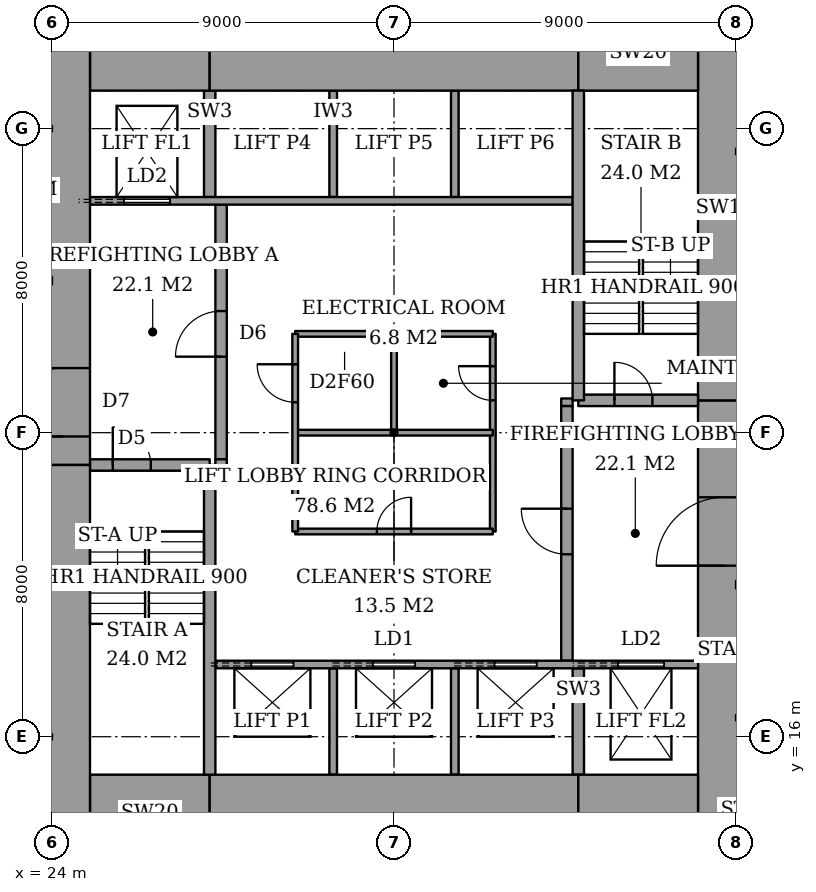
"""IFC4 building model, lengths in metres.
Left out: names, types, materials, properties, quantities, classifications, styles, units other than length and angle.
Written with IfcOpenShell. Run it as: python <this file> out.ifc"""

import sys

from ifc_helpers import new_model, si_unit, direction, frame, frame_2d, origin, place, context, subcontext, project, spatial, rectangle, extrude, element, fill, save


model = new_model("IFC4")
c1 = context("Model", 3, precision=1e-05, world=origin(), true_north=direction((0.0, 1.0)))
c2 = subcontext(c1, "Body", "Model", "MODEL_VIEW")
j1 = project(units=[si_unit("LENGTHUNIT", "METRE"), si_unit("PLANEANGLEUNIT", "RADIAN")], contexts=[c1])
p1 = place(None, origin())
s1 = spatial("IfcSite", under=j1, at=p1, CompositionType="ELEMENT")
p2 = place(p1, origin())
s2 = spatial("IfcBuilding", under=s1, at=p2, CompositionType="ELEMENT")
p3 = place(p2, frame((0.0, 0.0, 135.8)))
s3 = spatial("IfcBuildingStorey", under=s2, at=p3, CompositionType="ELEMENT", Elevation=135.8)
p4 = place(p3, frame((25.0, 14.0, 0.0), z_axis=(0.0, 0.0, 1.0), x_axis=(1.0, 0.0, 0.0)))
e1 = element("IfcWall", 1, at=p4, inside=s3, PredefinedType="SHEAR", context=c2, shape_type="SweptSolid", body=[
    extrude(rectangle(XDim=3.15, YDim=2.0, at=frame_2d((1.575, 0.0))), origin(), (0.0, 0.0, 1.0), 3.6),
])
p5 = place(p3, frame((28.15, 14.0, 0.0), z_axis=(0.0, 0.0, 1.0), x_axis=(1.0, 0.0, 0.0)))
e2 = element("IfcWall", 2, at=p5, inside=s3, PredefinedType="SHEAR", context=c2, shape_type="SweptSolid", body=[
    extrude(rectangle(XDim=9.7, YDim=2.0, at=frame_2d((4.85, 0.0))), origin(), (0.0, 0.0, 1.0), 3.6),
])
for number, where, z_axis, x_axis in (
    (3, (37.85, 14.0, 0.0), (0.0, 0.0, 1.0), (1.0, 0.0, 0.0)),
    (4, (25.0, 34.0, 0.0), (0.0, 0.0, 1.0), (1.0, 0.0, 0.0)),
):
    element("IfcWall", number, at=place(p3, frame(where, z_axis=z_axis, x_axis=x_axis)), inside=s3, PredefinedType="SHEAR", context=c2, shape_type="SweptSolid", body=[
        extrude(rectangle(XDim=3.15, YDim=2.0, at=frame_2d((1.575, 0.0))), origin(), (0.0, 0.0, 1.0), 3.6),
    ])
p6 = place(p3, frame((28.15, 34.0, 0.0), z_axis=(0.0, 0.0, 1.0), x_axis=(1.0, 0.0, 0.0)))
e5 = element("IfcWall", 5, at=p6, inside=s3, PredefinedType="SHEAR", context=c2, shape_type="SweptSolid", body=[
    extrude(rectangle(XDim=9.7, YDim=2.0, at=frame_2d((4.85, 0.0))), origin(), (0.0, 0.0, 1.0), 3.6),
])
p7 = place(p3, frame((37.85, 34.0, 0.0), z_axis=(0.0, 0.0, 1.0), x_axis=(1.0, 0.0, 0.0)))
e6 = element("IfcWall", 6, at=p7, inside=s3, PredefinedType="SHEAR", context=c2, shape_type="SweptSolid", body=[
    extrude(rectangle(XDim=3.15, YDim=2.0, at=frame_2d((1.575, 0.0))), origin(), (0.0, 0.0, 1.0), 3.6),
])
p8 = place(p3, frame((24.3, 13.0, 0.0), z_axis=(0.0, 0.0, 1.0), x_axis=(0.0, 1.0, 0.0)))
e7 = element("IfcWall", 7, at=p8, inside=s3, PredefinedType="SHEAR", context=c2, shape_type="SweptSolid", body=[
    extrude(rectangle(XDim=10.15, YDim=1.4, at=frame_2d((5.075, 0.0))), origin(), (0.0, 0.0, 1.0), 3.6),
])
p9 = place(p3, frame((24.3, 23.15, 0.0), z_axis=(0.0, 0.0, 1.0), x_axis=(0.0, 1.0, 0.0)))
e8 = element("IfcWall", 8, at=p9, inside=s3, PredefinedType="SHEAR", context=c2, shape_type="SweptSolid", body=[
    extrude(rectangle(XDim=11.85, YDim=1.4, at=frame_2d((5.925, 0.0))), origin(), (0.0, 0.0, 1.0), 3.6),
])
p10 = place(p9, frame((0.75, 0.0, 0.0)))
e9 = element("IfcOpeningElement", 9, at=p10, cuts=e8, PredefinedType="OPENING", context=c2, shape_type="SweptSolid", body=[
    extrude(rectangle(XDim=1.8, YDim=2.4, at=frame_2d((0.9, 1.2))), frame((0.0, 0.71, 0.0), z_axis=(0.0, -1.0, 0.0), x_axis=(1.0, 0.0, 0.0)), (0.0, 0.0, 1.0), 1.42),
])
p11 = place(p3, frame((41.7, 13.0, 0.0), z_axis=(0.0, 0.0, 1.0), x_axis=(0.0, 1.0, 0.0)))
e10 = element("IfcWall", 10, at=p11, inside=s3, PredefinedType="SHEAR", context=c2, shape_type="SweptSolid", body=[
    extrude(rectangle(XDim=11.85, YDim=1.4, at=frame_2d((5.925, 0.0))), origin(), (0.0, 0.0, 1.0), 3.6),
])
p12 = place(p11, frame((7.5, 0.0, 0.0)))
e11 = element("IfcOpeningElement", 11, at=p12, cuts=e10, PredefinedType="OPENING", context=c2, shape_type="SweptSolid", body=[
    extrude(rectangle(XDim=1.8, YDim=2.4, at=frame_2d((0.9, 1.2))), frame((0.0, 0.71, 0.0), z_axis=(0.0, -1.0, 0.0), x_axis=(1.0, 0.0, 0.0)), (0.0, 0.0, 1.0), 1.42),
])
p13 = place(p3, frame((41.7, 24.85, 0.0), z_axis=(0.0, 0.0, 1.0), x_axis=(0.0, 1.0, 0.0)))
e12 = element("IfcWall", 12, at=p13, inside=s3, PredefinedType="SHEAR", context=c2, shape_type="SweptSolid", body=[
    extrude(rectangle(XDim=10.15, YDim=1.4, at=frame_2d((5.075, 0.0))), origin(), (0.0, 0.0, 1.0), 3.6),
])
p14 = place(p3, frame((28.15, 15.0, 0.0), z_axis=(0.0, 0.0, 1.0), x_axis=(0.0, 1.0, 0.0)))
e13 = element("IfcWall", 13, at=p14, inside=s3, PredefinedType="SHEAR", context=c2, shape_type="SweptSolid", body=[
    extrude(rectangle(XDim=8.15, YDim=0.3, at=frame_2d((4.075, 0.0))), origin(), (0.0, 0.0, 1.0), 3.6),
])
p15 = place(p3, frame((25.0, 23.15, 0.0), z_axis=(0.0, 0.0, 1.0), x_axis=(1.0, 0.0, 0.0)))
e14 = element("IfcWall", 14, at=p15, inside=s3, PredefinedType="SHEAR", context=c2, shape_type="SweptSolid", body=[
    extrude(rectangle(XDim=3.15, YDim=0.3, at=frame_2d((1.575, 0.0))), origin(), (0.0, 0.0, 1.0), 3.6),
])
p16 = place(p15, frame((0.6, 0.0, 0.0)))
e15 = element("IfcOpeningElement", 15, at=p16, cuts=e14, PredefinedType="OPENING", context=c2, shape_type="SweptSolid", body=[
    extrude(rectangle(XDim=1.0, YDim=2.1, at=frame_2d((0.5, 1.05))), frame((0.0, 0.16, 0.0), z_axis=(0.0, -1.0, 0.0), x_axis=(1.0, 0.0, 0.0)), (0.0, 0.0, 1.0), 0.32),
])
p17 = place(p3, frame((37.85, 24.85, 0.0), z_axis=(0.0, 0.0, 1.0), x_axis=(0.0, 1.0, 0.0)))
e16 = element("IfcWall", 16, at=p17, inside=s3, PredefinedType="SHEAR", context=c2, shape_type="SweptSolid", body=[
    extrude(rectangle(XDim=8.15, YDim=0.3, at=frame_2d((4.075, 0.0))), origin(), (0.0, 0.0, 1.0), 3.6),
])
p18 = place(p3, frame((37.85, 24.85, 0.0), z_axis=(0.0, 0.0, 1.0), x_axis=(1.0, 0.0, 0.0)))
e17 = element("IfcWall", 17, at=p18, inside=s3, PredefinedType="SHEAR", context=c2, shape_type="SweptSolid", body=[
    extrude(rectangle(XDim=3.15, YDim=0.3, at=frame_2d((1.575, 0.0))), origin(), (0.0, 0.0, 1.0), 3.6),
])
p19 = place(p18, frame((0.95, 0.0, 0.0)))
e18 = element("IfcOpeningElement", 18, at=p19, cuts=e17, PredefinedType="OPENING", context=c2, shape_type="SweptSolid", body=[
    extrude(rectangle(XDim=1.0, YDim=2.1, at=frame_2d((0.5, 1.05))), frame((0.0, 0.16, 0.0), z_axis=(0.0, -1.0, 0.0), x_axis=(1.0, 0.0, 0.0)), (0.0, 0.0, 1.0), 0.32),
])
p20 = place(p3, frame((28.45, 23.3, 0.0), z_axis=(0.0, 0.0, 1.0), x_axis=(0.0, 1.0, 0.0)))
e19 = element("IfcWall", 19, at=p20, inside=s3, PredefinedType="PARTITIONING", context=c2, shape_type="SweptSolid", body=[
    extrude(rectangle(XDim=6.7, YDim=0.3, at=frame_2d((3.35, 0.0))), origin(), (0.0, 0.0, 1.0), 3.6),
])
p21 = place(p20, frame((2.7, 0.0, 0.0)))
e20 = element("IfcOpeningElement", 20, at=p21, cuts=e19, PredefinedType="OPENING", context=c2, shape_type="SweptSolid", body=[
    extrude(rectangle(XDim=1.2, YDim=2.1, at=frame_2d((0.6, 1.05))), frame((0.0, 0.16, 0.0), z_axis=(0.0, -1.0, 0.0), x_axis=(1.0, 0.0, 0.0)), (0.0, 0.0, 1.0), 0.32),
])
p22 = place(p3, frame((37.55, 18.0, 0.0), z_axis=(0.0, 0.0, 1.0), x_axis=(0.0, 1.0, 0.0)))
e21 = element("IfcWall", 21, at=p22, inside=s3, PredefinedType="PARTITIONING", context=c2, shape_type="SweptSolid", body=[
    extrude(rectangle(XDim=6.7, YDim=0.3, at=frame_2d((3.35, 0.0))), origin(), (0.0, 0.0, 1.0), 3.6),
])
p23 = place(p22, frame((2.8, 0.0, 0.0)))
e22 = element("IfcOpeningElement", 22, at=p23, cuts=e21, PredefinedType="OPENING", context=c2, shape_type="SweptSolid", body=[
    extrude(rectangle(XDim=1.2, YDim=2.1, at=frame_2d((0.6, 1.05))), frame((0.0, 0.16, 0.0), z_axis=(0.0, -1.0, 0.0), x_axis=(1.0, 0.0, 0.0)), (0.0, 0.0, 1.0), 0.32),
])
p24 = place(p3, frame((28.3, 17.9, 0.0), z_axis=(0.0, 0.0, 1.0), x_axis=(1.0, 0.0, 0.0)))
e23 = element("IfcWall", 23, at=p24, inside=s3, PredefinedType="PARTITIONING", context=c2, shape_type="SweptSolid", body=[
    extrude(rectangle(XDim=12.7, YDim=0.2, at=frame_2d((6.35, 0.0))), origin(), (0.0, 0.0, 1.0), 3.6),
])
p25 = place(p24, frame((0.95, 0.0, 0.0)))
e24 = element("IfcOpeningElement", 24, at=p25, cuts=e23, PredefinedType="OPENING", context=c2, shape_type="SweptSolid", body=[
    extrude(rectangle(XDim=1.1, YDim=2.1, at=frame_2d((0.55, 1.05))), frame((0.0, 0.11, 0.0), z_axis=(0.0, -1.0, 0.0), x_axis=(1.0, 0.0, 0.0)), (0.0, 0.0, 1.0), 0.22),
])
p26 = place(p24, frame((4.15, 0.0, 0.0)))
e25 = element("IfcOpeningElement", 25, at=p26, cuts=e23, PredefinedType="OPENING", context=c2, shape_type="SweptSolid", body=[
    extrude(rectangle(XDim=1.1, YDim=2.1, at=frame_2d((0.55, 1.05))), frame((0.0, 0.11, 0.0), z_axis=(0.0, -1.0, 0.0), x_axis=(1.0, 0.0, 0.0)), (0.0, 0.0, 1.0), 0.22),
])
p27 = place(p24, frame((7.35, 0.0, 0.0)))
e26 = element("IfcOpeningElement", 26, at=p27, cuts=e23, PredefinedType="OPENING", context=c2, shape_type="SweptSolid", body=[
    extrude(rectangle(XDim=1.1, YDim=2.1, at=frame_2d((0.55, 1.05))), frame((0.0, 0.11, 0.0), z_axis=(0.0, -1.0, 0.0), x_axis=(1.0, 0.0, 0.0)), (0.0, 0.0, 1.0), 0.22),
])
p28 = place(p24, frame((10.6, 0.0, 0.0)))
e27 = element("IfcOpeningElement", 27, at=p28, cuts=e23, PredefinedType="OPENING", context=c2, shape_type="SweptSolid", body=[
    extrude(rectangle(XDim=1.2, YDim=2.1, at=frame_2d((0.6, 1.05))), frame((0.0, 0.11, 0.0), z_axis=(0.0, -1.0, 0.0), x_axis=(1.0, 0.0, 0.0)), (0.0, 0.0, 1.0), 0.22),
])
p29 = place(p3, frame((25.0, 30.1, 0.0), z_axis=(0.0, 0.0, 1.0), x_axis=(1.0, 0.0, 0.0)))
e28 = element("IfcWall", 28, at=p29, inside=s3, PredefinedType="PARTITIONING", context=c2, shape_type="SweptSolid", body=[
    extrude(rectangle(XDim=12.7, YDim=0.2, at=frame_2d((6.35, 0.0))), origin(), (0.0, 0.0, 1.0), 3.6),
])
p30 = place(p29, frame((0.9, 0.0, 0.0)))
e29 = element("IfcOpeningElement", 29, at=p30, cuts=e28, PredefinedType="OPENING", context=c2, shape_type="SweptSolid", body=[
    extrude(rectangle(XDim=1.2, YDim=2.1, at=frame_2d((0.6, 1.05))), frame((0.0, 0.11, 0.0), z_axis=(0.0, -1.0, 0.0), x_axis=(1.0, 0.0, 0.0)), (0.0, 0.0, 1.0), 0.22),
])
for number, where, z_axis, x_axis in (
    (30, (31.4, 15.0, 0.0), (0.0, 0.0, 1.0), (0.0, 1.0, 0.0)),
    (31, (34.6, 15.0, 0.0), (0.0, 0.0, 1.0), (0.0, 1.0, 0.0)),
):
    element("IfcWall", number, at=place(p3, frame(where, z_axis=z_axis, x_axis=x_axis)), inside=s3, PredefinedType="PARTITIONING", context=c2, shape_type="SweptSolid", body=[
        extrude(rectangle(XDim=2.8, YDim=0.2, at=frame_2d((1.4, 0.0))), origin(), (0.0, 0.0, 1.0), 3.6),
    ])
p31 = place(p3, frame((37.85, 15.0, 0.0), z_axis=(0.0, 0.0, 1.0), x_axis=(0.0, 1.0, 0.0)))
e32 = element("IfcWall", 32, at=p31, inside=s3, PredefinedType="SHEAR", context=c2, shape_type="SweptSolid", body=[
    extrude(rectangle(XDim=2.8, YDim=0.3, at=frame_2d((1.4, 0.0))), origin(), (0.0, 0.0, 1.0), 3.6),
])
for number, where, z_axis, x_axis in (
    (33, (31.4, 30.2, 0.0), (0.0, 0.0, 1.0), (0.0, 1.0, 0.0)),
    (34, (34.6, 30.2, 0.0), (0.0, 0.0, 1.0), (0.0, 1.0, 0.0)),
):
    element("IfcWall", number, at=place(p3, frame(where, z_axis=z_axis, x_axis=x_axis)), inside=s3, PredefinedType="PARTITIONING", context=c2, shape_type="SweptSolid", body=[
        extrude(rectangle(XDim=2.8, YDim=0.2, at=frame_2d((1.4, 0.0))), origin(), (0.0, 0.0, 1.0), 3.6),
    ])
p32 = place(p3, frame((28.15, 30.2, 0.0), z_axis=(0.0, 0.0, 1.0), x_axis=(0.0, 1.0, 0.0)))
e35 = element("IfcWall", 35, at=p32, inside=s3, PredefinedType="SHEAR", context=c2, shape_type="SweptSolid", body=[
    extrude(rectangle(XDim=2.8, YDim=0.3, at=frame_2d((1.4, 0.0))), origin(), (0.0, 0.0, 1.0), 3.6),
])
for number, where, z_axis, x_axis in (
    (36, (28.3, 23.2, 0.0), (0.0, 0.0, 1.0), (1.0, 0.0, 0.0)),
    (37, (37.4, 24.8, 0.0), (0.0, 0.0, 1.0), (1.0, 0.0, 0.0)),
):
    element("IfcWall", number, at=place(p3, frame(where, z_axis=z_axis, x_axis=x_axis)), inside=s3, PredefinedType="PARTITIONING", context=c2, shape_type="SweptSolid", body=[
        extrude(rectangle(XDim=0.3, YDim=0.2, at=frame_2d((0.15, 0.0))), origin(), (0.0, 0.0, 1.0), 3.6),
    ])
p33 = place(p3, frame((30.4, 21.4, 0.0), z_axis=(0.0, 0.0, 1.0), x_axis=(1.0, 0.0, 0.0)))
e38 = element("IfcWall", 38, at=p33, inside=s3, PredefinedType="PARTITIONING", context=c2, shape_type="SweptSolid", body=[
    extrude(rectangle(XDim=5.2, YDim=0.15, at=frame_2d((2.6, 0.0))), origin(), (0.0, 0.0, 1.0), 3.35),
])
p34 = place(p33, frame((2.15, 0.0, 0.0)))
e39 = element("IfcOpeningElement", 39, at=p34, cuts=e38, PredefinedType="OPENING", context=c2, shape_type="SweptSolid", body=[
    extrude(rectangle(XDim=0.9, YDim=2.1, at=frame_2d((0.45, 1.05))), frame((0.0, 0.085, 0.0), z_axis=(0.0, -1.0, 0.0), x_axis=(1.0, 0.0, 0.0)), (0.0, 0.0, 1.0), 0.17),
])
p35 = place(p3, frame((30.4, 26.6, 0.0), z_axis=(0.0, 0.0, 1.0), x_axis=(1.0, 0.0, 0.0)))
e40 = element("IfcWall", 40, at=p35, inside=s3, PredefinedType="PARTITIONING", context=c2, shape_type="SweptSolid", body=[
    extrude(rectangle(XDim=5.2, YDim=0.15, at=frame_2d((2.6, 0.0))), origin(), (0.0, 0.0, 1.0), 3.35),
])
p36 = place(p3, frame((30.4, 21.4, 0.0), z_axis=(0.0, 0.0, 1.0), x_axis=(0.0, 1.0, 0.0)))
e41 = element("IfcWall", 41, at=p36, inside=s3, PredefinedType="PARTITIONING", context=c2, shape_type="SweptSolid", body=[
    extrude(rectangle(XDim=5.2, YDim=0.15, at=frame_2d((2.6, 0.0))), origin(), (0.0, 0.0, 1.0), 3.35),
])
p37 = place(p36, frame((3.4, 0.0, 0.0)))
e42 = element("IfcOpeningElement", 42, at=p37, cuts=e41, PredefinedType="OPENING", context=c2, shape_type="SweptSolid", body=[
    extrude(rectangle(XDim=1.0, YDim=2.1, at=frame_2d((0.5, 1.05))), frame((0.0, 0.085, 0.0), z_axis=(0.0, -1.0, 0.0), x_axis=(1.0, 0.0, 0.0)), (0.0, 0.0, 1.0), 0.17),
])
p38 = place(p3, frame((35.6, 21.4, 0.0), z_axis=(0.0, 0.0, 1.0), x_axis=(0.0, 1.0, 0.0)))
e43 = element("IfcWall", 43, at=p38, inside=s3, PredefinedType="PARTITIONING", context=c2, shape_type="SweptSolid", body=[
    extrude(rectangle(XDim=5.2, YDim=0.15, at=frame_2d((2.6, 0.0))), origin(), (0.0, 0.0, 1.0), 3.35),
])
p39 = place(p38, frame((3.45, 0.0, 0.0)))
e44 = element("IfcOpeningElement", 44, at=p39, cuts=e43, PredefinedType="OPENING", context=c2, shape_type="SweptSolid", body=[
    extrude(rectangle(XDim=0.9, YDim=2.1, at=frame_2d((0.45, 1.05))), frame((0.0, 0.085, 0.0), z_axis=(0.0, -1.0, 0.0), x_axis=(1.0, 0.0, 0.0)), (0.0, 0.0, 1.0), 0.17),
])
p40 = place(p3, frame((30.4, 24.0, 0.0), z_axis=(0.0, 0.0, 1.0), x_axis=(1.0, 0.0, 0.0)))
e45 = element("IfcWall", 45, at=p40, inside=s3, PredefinedType="PARTITIONING", context=c2, shape_type="SweptSolid", body=[
    extrude(rectangle(XDim=5.2, YDim=0.15, at=frame_2d((2.6, 0.0))), origin(), (0.0, 0.0, 1.0), 3.35),
])
p41 = place(p3, frame((33.0, 24.0, 0.0), z_axis=(0.0, 0.0, 1.0), x_axis=(0.0, 1.0, 0.0)))
e46 = element("IfcWall", 46, at=p41, inside=s3, PredefinedType="PARTITIONING", context=c2, shape_type="SweptSolid", body=[
    extrude(rectangle(XDim=2.6, YDim=0.15, at=frame_2d((1.3, 0.0))), origin(), (0.0, 0.0, 1.0), 3.35),
])
p42 = place(p16, origin())
e47 = element("IfcDoor", 47, at=p42, inside=s3, OperationType="SINGLE_SWING_RIGHT", PredefinedType="DOOR", context=c2, shape_type="SweptSolid", body=[
    extrude(rectangle(XDim=1.0, YDim=2.1, at=frame_2d((0.5, 1.05))), frame((0.0, 0.025, 0.0), z_axis=(0.0, -1.0, 0.0), x_axis=(1.0, 0.0, 0.0)), (0.0, 0.0, 1.0), 0.05),
])
fill(e15, e47)
p43 = place(p19, origin())
e48 = element("IfcDoor", 48, at=p43, inside=s3, OperationType="SINGLE_SWING_RIGHT", PredefinedType="DOOR", context=c2, shape_type="SweptSolid", body=[
    extrude(rectangle(XDim=1.0, YDim=2.1, at=frame_2d((0.5, 1.05))), frame((0.0, 0.025, 0.0), z_axis=(0.0, -1.0, 0.0), x_axis=(1.0, 0.0, 0.0)), (0.0, 0.0, 1.0), 0.05),
])
fill(e18, e48)
p44 = place(p21, origin())
e49 = element("IfcDoor", 49, at=p44, inside=s3, OperationType="SINGLE_SWING_RIGHT", PredefinedType="DOOR", context=c2, shape_type="SweptSolid", body=[
    extrude(rectangle(XDim=1.2, YDim=2.1, at=frame_2d((0.6, 1.05))), frame((0.0, 0.025, 0.0), z_axis=(0.0, -1.0, 0.0), x_axis=(1.0, 0.0, 0.0)), (0.0, 0.0, 1.0), 0.05),
])
fill(e20, e49)
p45 = place(p23, origin())
e50 = element("IfcDoor", 50, at=p45, inside=s3, OperationType="SINGLE_SWING_LEFT", PredefinedType="DOOR", context=c2, shape_type="SweptSolid", body=[
    extrude(rectangle(XDim=1.2, YDim=2.1, at=frame_2d((0.6, 1.05))), frame((0.0, 0.025, 0.0), z_axis=(0.0, -1.0, 0.0), x_axis=(1.0, 0.0, 0.0)), (0.0, 0.0, 1.0), 0.05),
])
fill(e22, e50)
p46 = place(p10, origin())
e51 = element("IfcDoor", 51, at=p46, inside=s3, OperationType="DOUBLE_DOOR_DOUBLE_SWING", PredefinedType="DOOR", context=c2, shape_type="SweptSolid", body=[
    extrude(rectangle(XDim=1.8, YDim=2.4, at=frame_2d((0.9, 1.2))), frame((0.0, 0.025, 0.0), z_axis=(0.0, -1.0, 0.0), x_axis=(1.0, 0.0, 0.0)), (0.0, 0.0, 1.0), 0.05),
])
fill(e9, e51)
p47 = place(p12, origin())
e52 = element("IfcDoor", 52, at=p47, inside=s3, OperationType="DOUBLE_DOOR_DOUBLE_SWING", PredefinedType="DOOR", context=c2, shape_type="SweptSolid", body=[
    extrude(rectangle(XDim=1.8, YDim=2.4, at=frame_2d((0.9, 1.2))), frame((0.0, 0.025, 0.0), z_axis=(0.0, -1.0, 0.0), x_axis=(1.0, 0.0, 0.0)), (0.0, 0.0, 1.0), 0.05),
])
fill(e11, e52)
p48 = place(p34, origin())
e53 = element("IfcDoor", 53, at=p48, inside=s3, OperationType="SINGLE_SWING_LEFT", PredefinedType="DOOR", context=c2, shape_type="SweptSolid", body=[
    extrude(rectangle(XDim=0.9, YDim=2.1, at=frame_2d((0.45, 1.05))), frame((0.0, 0.025, 0.0), z_axis=(0.0, -1.0, 0.0), x_axis=(1.0, 0.0, 0.0)), (0.0, 0.0, 1.0), 0.05),
])
fill(e39, e53)
p49 = place(p37, origin())
e54 = element("IfcDoor", 54, at=p49, inside=s3, OperationType="SINGLE_SWING_LEFT", PredefinedType="DOOR", context=c2, shape_type="SweptSolid", body=[
    extrude(rectangle(XDim=1.0, YDim=2.1, at=frame_2d((0.5, 1.05))), frame((0.0, 0.025, 0.0), z_axis=(0.0, -1.0, 0.0), x_axis=(1.0, 0.0, 0.0)), (0.0, 0.0, 1.0), 0.05),
])
fill(e42, e54)
p50 = place(p39, origin())
e55 = element("IfcDoor", 55, at=p50, inside=s3, OperationType="SINGLE_SWING_LEFT", PredefinedType="DOOR", context=c2, shape_type="SweptSolid", body=[
    extrude(rectangle(XDim=0.9, YDim=2.1, at=frame_2d((0.45, 1.05))), frame((0.0, 0.025, 0.0), z_axis=(0.0, -1.0, 0.0), x_axis=(1.0, 0.0, 0.0)), (0.0, 0.0, 1.0), 0.05),
])
fill(e44, e55)
p51 = place(p25, origin())
e56 = element("IfcDoor", 56, at=p51, inside=s3, OperationType="SLIDING_TO_LEFT", PredefinedType="DOOR", context=c2, shape_type="SweptSolid", body=[
    extrude(rectangle(XDim=1.1, YDim=2.1, at=frame_2d((0.55, 1.05))), frame((0.0, 0.025, 0.0), z_axis=(0.0, -1.0, 0.0), x_axis=(1.0, 0.0, 0.0)), (0.0, 0.0, 1.0), 0.05),
])
fill(e24, e56)
p52 = place(p26, origin())
e57 = element("IfcDoor", 57, at=p52, inside=s3, OperationType="SLIDING_TO_LEFT", PredefinedType="DOOR", context=c2, shape_type="SweptSolid", body=[
    extrude(rectangle(XDim=1.1, YDim=2.1, at=frame_2d((0.55, 1.05))), frame((0.0, 0.025, 0.0), z_axis=(0.0, -1.0, 0.0), x_axis=(1.0, 0.0, 0.0)), (0.0, 0.0, 1.0), 0.05),
])
fill(e25, e57)
p53 = place(p27, origin())
e58 = element("IfcDoor", 58, at=p53, inside=s3, OperationType="SLIDING_TO_LEFT", PredefinedType="DOOR", context=c2, shape_type="SweptSolid", body=[
    extrude(rectangle(XDim=1.1, YDim=2.1, at=frame_2d((0.55, 1.05))), frame((0.0, 0.025, 0.0), z_axis=(0.0, -1.0, 0.0), x_axis=(1.0, 0.0, 0.0)), (0.0, 0.0, 1.0), 0.05),
])
fill(e26, e58)
p54 = place(p30, origin())
e59 = element("IfcDoor", 59, at=p54, inside=s3, OperationType="SLIDING_TO_LEFT", PredefinedType="DOOR", context=c2, shape_type="SweptSolid", body=[
    extrude(rectangle(XDim=1.2, YDim=2.1, at=frame_2d((0.6, 1.05))), frame((0.0, 0.025, 0.0), z_axis=(0.0, -1.0, 0.0), x_axis=(1.0, 0.0, 0.0)), (0.0, 0.0, 1.0), 0.05),
])
fill(e29, e59)
p55 = place(p28, origin())
e60 = element("IfcDoor", 60, at=p55, inside=s3, OperationType="SLIDING_TO_LEFT", PredefinedType="DOOR", context=c2, shape_type="SweptSolid", body=[
    extrude(rectangle(XDim=1.2, YDim=2.1, at=frame_2d((0.6, 1.05))), frame((0.0, 0.025, 0.0), z_axis=(0.0, -1.0, 0.0), x_axis=(1.0, 0.0, 0.0)), (0.0, 0.0, 1.0), 0.05),
])
fill(e27, e60)
save(model, sys.argv[1])
